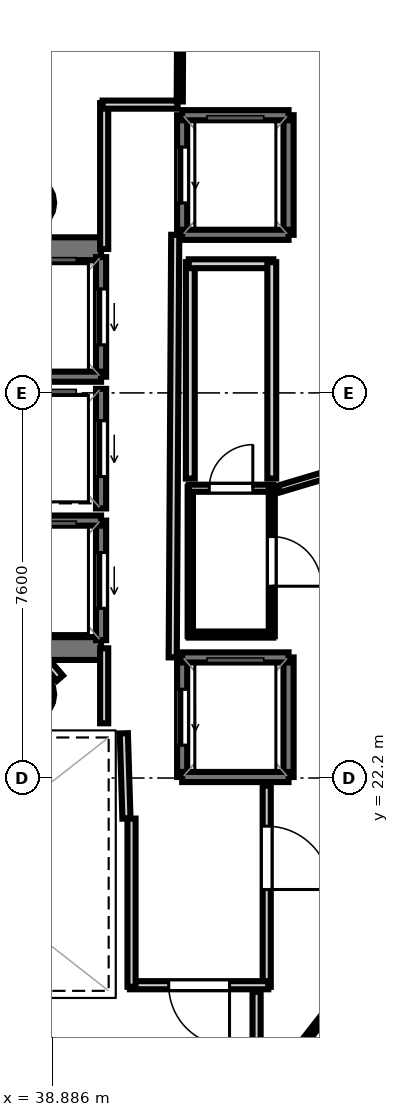
"""IFC4 building model, lengths in metres.
Left out: names, types, materials, properties, quantities, classifications, styles, units other than length and angle.
Written with IfcOpenShell. Run it as: python <this file> out.ifc"""

import sys

from ifc_helpers import new_model, si_unit, direction, frame, frame_2d, origin, origin_2d, place, context, subcontext, project, spatial, rectangle, hollow_circle, extrude, element, fill, save


model = new_model("IFC4")
c1 = context("Model", 3, precision=1e-05, world=origin(), true_north=direction((0.0, 1.0)))
c2 = subcontext(c1, "Body", "Model", "MODEL_VIEW")
j1 = project(units=[si_unit("LENGTHUNIT", "METRE"), si_unit("PLANEANGLEUNIT", "RADIAN")], contexts=[c1])
p1 = place(None, origin())
s1 = spatial("IfcSite", under=j1, at=p1, CompositionType="ELEMENT")
p2 = place(p1, origin())
s2 = spatial("IfcBuilding", under=s1, at=p2, CompositionType="ELEMENT")
p3 = place(p2, frame((0.0, 0.0, 264.9)))
s3 = spatial("IfcBuildingStorey", under=s2, at=p3, CompositionType="ELEMENT", Elevation=264.9)
p4 = place(p3, frame((29.33, 32.645, 0.0), z_axis=(0.0, 0.0, 1.0), x_axis=(1.0, 0.0, 0.0)))
e1 = element("IfcWall", 1, at=p4, inside=s3, PredefinedType="SHEAR", context=c2, shape_type="SweptSolid", body=[
    extrude(rectangle(XDim=10.52, YDim=0.45, at=frame_2d((5.26, 0.0))), origin(), (0.0, 0.0, 1.0), 3.52),
])
p5 = place(p4, frame((0.895, 0.0, 0.0)))
e2 = element("IfcOpeningElement", 2, at=p5, cuts=e1, PredefinedType="OPENING", context=c2, shape_type="SweptSolid", body=[
    extrude(rectangle(XDim=1.25, YDim=2.15, at=frame_2d((0.625, 1.075))), frame((0.0, 0.235, 0.0), z_axis=(0.0, -1.0, 0.0), x_axis=(1.0, 0.0, 0.0)), (0.0, 0.0, 1.0), 0.47),
])
p6 = place(p3, frame((29.33, 24.755, 0.0), z_axis=(0.0, 0.0, 1.0), x_axis=(1.0, 0.0, 0.0)))
e3 = element("IfcWall", 3, at=p6, inside=s3, PredefinedType="SHEAR", context=c2, shape_type="SweptSolid", body=[
    extrude(rectangle(XDim=10.52, YDim=0.45, at=frame_2d((5.26, 0.0))), origin(), (0.0, 0.0, 1.0), 3.52),
])
p7 = place(p6, frame((0.695, 0.0, 0.0)))
e4 = element("IfcOpeningElement", 4, at=p7, cuts=e3, PredefinedType="OPENING", context=c2, shape_type="SweptSolid", body=[
    extrude(rectangle(XDim=1.25, YDim=2.15, at=frame_2d((0.625, 1.075))), frame((0.0, 0.235, 0.0), z_axis=(0.0, -1.0, 0.0), x_axis=(1.0, 0.0, 0.0)), (0.0, 0.0, 1.0), 0.47),
])
for number, where, z_axis, x_axis in (
    (5, (38.4, 33.55, 0.0), (0.0, 0.0, 1.0), (1.0, 0.0, 0.0)),
    (6, (38.4, 23.85, 0.0), (0.0, 0.0, 1.0), (1.0, 0.0, 0.0)),
):
    element("IfcColumn", number, at=place(p3, frame(where, z_axis=z_axis, x_axis=x_axis)), inside=s3, PredefinedType="COLUMN", context=c2, shape_type="SweptSolid", body=[
        extrude(hollow_circle(Radius=0.525, WallThickness=0.028, at=origin_2d()), origin(), (0.0, 0.0, 1.0), 3.7),
    ])
p8 = place(p3, frame((39.85, 30.12, 0.0), z_axis=(0.0, 0.0, 1.0), x_axis=(0.0, 1.0, 0.0)))
e7 = element("IfcWall", 7, at=p8, inside=s3, PredefinedType="SOLIDWALL", context=c2, shape_type="SweptSolid", body=[
    extrude(rectangle(XDim=2.36, YDim=0.2, at=frame_2d((1.18, 0.0))), origin(), (0.0, 0.0, 1.0), 3.52),
])
p9 = place(p8, frame((0.63, 0.0, 0.0)))
e8 = element("IfcOpeningElement", 8, at=p9, cuts=e7, PredefinedType="OPENING", context=c2, shape_type="SweptSolid", body=[
    extrude(rectangle(XDim=1.1, YDim=2.15, at=frame_2d((0.55, 1.075))), frame((0.0, 0.11, 0.0), z_axis=(0.0, -1.0, 0.0), x_axis=(1.0, 0.0, 0.0)), (0.0, 0.0, 1.0), 0.22),
])
p10 = place(p3, frame((37.75, 30.12, 0.0), z_axis=(0.0, 0.0, 1.0), x_axis=(1.0, 0.0, 0.0)))
e9 = element("IfcWall", 9, at=p10, inside=s3, PredefinedType="SOLIDWALL", context=c2, shape_type="SweptSolid", body=[
    extrude(rectangle(XDim=2.1, YDim=0.2, at=frame_2d((1.05, 0.0))), origin(), (0.0, 0.0, 1.0), 3.52),
])
p11 = place(p3, frame((39.85, 24.92, 0.0), z_axis=(0.0, 0.0, 1.0), x_axis=(0.0, 1.0, 0.0)))
e10 = element("IfcWall", 10, at=p11, inside=s3, PredefinedType="SOLIDWALL", context=c2, shape_type="SweptSolid", body=[
    extrude(rectangle(XDim=2.36, YDim=0.2, at=frame_2d((1.18, 0.0))), origin(), (0.0, 0.0, 1.0), 3.52),
])
p12 = place(p11, frame((0.63, 0.0, 0.0)))
e11 = element("IfcOpeningElement", 11, at=p12, cuts=e10, PredefinedType="OPENING", context=c2, shape_type="SweptSolid", body=[
    extrude(rectangle(XDim=1.1, YDim=2.15, at=frame_2d((0.55, 1.075))), frame((0.0, 0.11, 0.0), z_axis=(0.0, -1.0, 0.0), x_axis=(1.0, 0.0, 0.0)), (0.0, 0.0, 1.0), 0.22),
])
p13 = place(p3, frame((37.75, 27.28, 0.0), z_axis=(0.0, 0.0, 1.0), x_axis=(1.0, 0.0, 0.0)))
e12 = element("IfcWall", 12, at=p13, inside=s3, PredefinedType="SOLIDWALL", context=c2, shape_type="SweptSolid", body=[
    extrude(rectangle(XDim=2.1, YDim=0.2, at=frame_2d((1.05, 0.0))), origin(), (0.0, 0.0, 1.0), 3.52),
])
p14 = place(p3, frame((39.85, 27.52, 0.0), z_axis=(0.0, 0.0, 1.0), x_axis=(0.0, 1.0, 0.0)))
e13 = element("IfcWall", 13, at=p14, inside=s3, PredefinedType="SOLIDWALL", context=c2, shape_type="SweptSolid", body=[
    extrude(rectangle(XDim=2.36, YDim=0.2, at=frame_2d((1.18, 0.0))), origin(), (0.0, 0.0, 1.0), 3.52),
])
p15 = place(p14, frame((0.63, 0.0, 0.0)))
e14 = element("IfcOpeningElement", 14, at=p15, cuts=e13, PredefinedType="OPENING", context=c2, shape_type="SweptSolid", body=[
    extrude(rectangle(XDim=1.1, YDim=2.15, at=frame_2d((0.55, 1.075))), frame((0.0, 0.11, 0.0), z_axis=(0.0, -1.0, 0.0), x_axis=(1.0, 0.0, 0.0)), (0.0, 0.0, 1.0), 0.22),
])
p16 = place(p3, frame((43.55, 22.22, 0.0), z_axis=(0.0, 0.0, 1.0), x_axis=(0.0, 1.0, 0.0)))
e15 = element("IfcWall", 15, at=p16, inside=s3, PredefinedType="SOLIDWALL", context=c2, shape_type="SweptSolid", body=[
    extrude(rectangle(XDim=2.36, YDim=0.2, at=frame_2d((1.18, 0.0))), origin(), (0.0, 0.0, 1.0), 3.52),
])
p17 = place(p3, frame((41.45, 22.22, 0.0), z_axis=(0.0, 0.0, 1.0), x_axis=(0.0, 1.0, 0.0)))
e16 = element("IfcWall", 16, at=p17, inside=s3, PredefinedType="SOLIDWALL", context=c2, shape_type="SweptSolid", body=[
    extrude(rectangle(XDim=2.36, YDim=0.2, at=frame_2d((1.18, 0.0))), origin(), (0.0, 0.0, 1.0), 3.52),
])
p18 = place(p17, frame((0.63, 0.0, 0.0)))
e17 = element("IfcOpeningElement", 17, at=p18, cuts=e16, PredefinedType="OPENING", context=c2, shape_type="SweptSolid", body=[
    extrude(rectangle(XDim=1.1, YDim=2.15, at=frame_2d((0.55, 1.075))), frame((0.0, 0.11, 0.0), z_axis=(0.0, -1.0, 0.0), x_axis=(1.0, 0.0, 0.0)), (0.0, 0.0, 1.0), 0.22),
])
for number, where, z_axis, x_axis in (
    (18, (41.45, 24.58, 0.0), (0.0, 0.0, 1.0), (1.0, 0.0, 0.0)),
    (19, (41.45, 22.22, 0.0), (0.0, 0.0, 1.0), (1.0, 0.0, 0.0)),
):
    element("IfcWall", number, at=place(p3, frame(where, z_axis=z_axis, x_axis=x_axis)), inside=s3, PredefinedType="SOLIDWALL", context=c2, shape_type="SweptSolid", body=[
        extrude(rectangle(XDim=2.1, YDim=0.2, at=frame_2d((1.05, 0.0))), origin(), (0.0, 0.0, 1.0), 3.52),
    ])
p19 = place(p3, frame((43.55, 32.92, 0.0), z_axis=(0.0, 0.0, 1.0), x_axis=(0.0, 1.0, 0.0)))
e20 = element("IfcWall", 20, at=p19, inside=s3, PredefinedType="SOLIDWALL", context=c2, shape_type="SweptSolid", body=[
    extrude(rectangle(XDim=2.36, YDim=0.2, at=frame_2d((1.18, 0.0))), origin(), (0.0, 0.0, 1.0), 3.52),
])
p20 = place(p3, frame((41.45, 32.92, 0.0), z_axis=(0.0, 0.0, 1.0), x_axis=(0.0, 1.0, 0.0)))
e21 = element("IfcWall", 21, at=p20, inside=s3, PredefinedType="SOLIDWALL", context=c2, shape_type="SweptSolid", body=[
    extrude(rectangle(XDim=2.36, YDim=0.2, at=frame_2d((1.18, 0.0))), origin(), (0.0, 0.0, 1.0), 3.52),
])
p21 = place(p20, frame((0.63, 0.0, 0.0)))
e22 = element("IfcOpeningElement", 22, at=p21, cuts=e21, PredefinedType="OPENING", context=c2, shape_type="SweptSolid", body=[
    extrude(rectangle(XDim=1.1, YDim=2.15, at=frame_2d((0.55, 1.075))), frame((0.0, 0.11, 0.0), z_axis=(0.0, -1.0, 0.0), x_axis=(1.0, 0.0, 0.0)), (0.0, 0.0, 1.0), 0.22),
])
for number, where, z_axis, x_axis in (
    (23, (41.45, 35.28, 0.0), (0.0, 0.0, 1.0), (1.0, 0.0, 0.0)),
    (24, (41.45, 32.92, 0.0), (0.0, 0.0, 1.0), (1.0, 0.0, 0.0)),
):
    element("IfcWall", number, at=place(p3, frame(where, z_axis=z_axis, x_axis=x_axis)), inside=s3, PredefinedType="SOLIDWALL", context=c2, shape_type="SweptSolid", body=[
        extrude(rectangle(XDim=2.1, YDim=0.2, at=frame_2d((1.05, 0.0))), origin(), (0.0, 0.0, 1.0), 3.52),
    ])
p22 = place(p3, frame((40.351, 21.401, 0.0), z_axis=(0.0, 0.0, 1.0), x_axis=(-0.031058045979, 0.999517582527, 0.0)))
e25 = element("IfcWall", 25, at=p22, inside=s3, PredefinedType="PARTITIONING", context=c2, shape_type="SweptSolid", body=[
    extrude(rectangle(XDim=1.682, YDim=0.16, at=frame_2d((0.841, 0.0))), origin(), (0.0, 0.0, 1.0), 2.84),
])
p23 = place(p3, frame((39.911, 23.28, 0.0), z_axis=(0.0, 0.0, 1.0), x_axis=(0.0, 1.0, 0.0)))
e26 = element("IfcWall", 26, at=p23, inside=s3, PredefinedType="PARTITIONING", context=c2, shape_type="SweptSolid", body=[
    extrude(rectangle(XDim=1.48, YDim=0.16, at=frame_2d((0.74, 0.0))), origin(), (0.0, 0.0, 1.0), 2.84),
])
p24 = place(p3, frame((39.911, 32.64, 0.0), z_axis=(0.0, 0.0, 1.0), x_axis=(0.0, 1.0, 0.0)))
e27 = element("IfcWall", 27, at=p24, inside=s3, PredefinedType="PARTITIONING", context=c2, shape_type="SweptSolid", body=[
    extrude(rectangle(XDim=2.88, YDim=0.16, at=frame_2d((1.44, 0.0))), origin(), (0.0, 0.0, 1.0), 2.84),
])
p25 = place(p3, frame((39.88, 35.489, 0.0), z_axis=(0.0, 0.0, 1.0), x_axis=(1.0, 0.0, 0.0)))
e28 = element("IfcWall", 28, at=p25, inside=s3, PredefinedType="PARTITIONING", context=c2, shape_type="SweptSolid", body=[
    extrude(rectangle(XDim=1.48, YDim=0.16, at=frame_2d((0.74, 0.0))), origin(), (0.0, 0.0, 1.0), 2.84),
])
p26 = place(p3, frame((41.313, 32.92, 0.0), z_axis=(0.0, 0.0, 1.0), x_axis=(-0.005942518022, -0.999982343084, 0.0)))
e29 = element("IfcWall", 29, at=p26, inside=s3, PredefinedType="PARTITIONING", context=c2, shape_type="SweptSolid", body=[
    extrude(rectangle(XDim=8.34, YDim=0.16, at=frame_2d((4.17, 0.0))), origin(), (0.0, 0.0, 1.0), 2.84),
])
p27 = place(p3, frame((43.119, 22.05, 0.0), z_axis=(0.0, 0.0, 1.0), x_axis=(0.0, -1.0, 0.0)))
e30 = element("IfcWall", 30, at=p27, inside=s3, PredefinedType="PARTITIONING", context=c2, shape_type="SweptSolid", body=[
    extrude(rectangle(XDim=3.97, YDim=0.16, at=frame_2d((1.985, 0.0))), origin(), (0.0, 0.0, 1.0), 2.84),
])
p28 = place(p27, frame((0.8, 0.0, 0.0)))
e31 = element("IfcOpeningElement", 31, at=p28, cuts=e30, PredefinedType="OPENING", context=c2, shape_type="SweptSolid", body=[
    extrude(rectangle(XDim=1.25, YDim=2.2, at=frame_2d((0.625, 1.1))), frame((0.0, 0.09, 0.0), z_axis=(0.0, -1.0, 0.0), x_axis=(1.0, 0.0, 0.0)), (0.0, 0.0, 1.0), 0.18),
])
p29 = place(p3, frame((43.15, 18.111, 0.0), z_axis=(0.0, 0.0, 1.0), x_axis=(-1.0, 0.0, 0.0)))
e32 = element("IfcWall", 32, at=p29, inside=s3, PredefinedType="PARTITIONING", context=c2, shape_type="SweptSolid", body=[
    extrude(rectangle(XDim=2.73, YDim=0.16, at=frame_2d((1.365, 0.0))), origin(), (0.0, 0.0, 1.0), 2.84),
])
p30 = place(p29, frame((0.765, 0.0, 0.0)))
e33 = element("IfcOpeningElement", 33, at=p30, cuts=e32, PredefinedType="OPENING", context=c2, shape_type="SweptSolid", body=[
    extrude(rectangle(XDim=1.2, YDim=2.15, at=frame_2d((0.6, 1.075))), frame((0.0, 0.09, 0.0), z_axis=(0.0, -1.0, 0.0), x_axis=(1.0, 0.0, 0.0)), (0.0, 0.0, 1.0), 0.18),
])
p31 = place(p3, frame((40.451, 18.08, 0.0), z_axis=(0.0, 0.0, 1.0), x_axis=(0.0, 1.0, 0.0)))
e34 = element("IfcWall", 34, at=p31, inside=s3, PredefinedType="PARTITIONING", context=c2, shape_type="SweptSolid", body=[
    extrude(rectangle(XDim=3.32, YDim=0.16, at=frame_2d((1.66, 0.0))), origin(), (0.0, 0.0, 1.0), 2.84),
])
p32 = place(p3, frame((43.25, 25.031, 0.0), z_axis=(0.0, 0.0, 1.0), x_axis=(-1.0, 0.0, 0.0)))
e35 = element("IfcWall", 35, at=p32, inside=s3, PredefinedType="PARTITIONING", context=c2, shape_type="SweptSolid", body=[
    extrude(rectangle(XDim=1.67, YDim=0.12, at=frame_2d((0.835, 0.0))), origin(), (0.0, 0.0, 1.0), 2.84),
])
p33 = place(p3, frame((41.611, 25.0, 0.0), z_axis=(0.0, 0.0, 1.0), x_axis=(0.0, 1.0, 0.0)))
e36 = element("IfcWall", 36, at=p33, inside=s3, PredefinedType="PARTITIONING", context=c2, shape_type="SweptSolid", body=[
    extrude(rectangle(XDim=2.95, YDim=0.105, at=frame_2d((1.475, 0.0))), origin(), (0.0, 0.0, 1.0), 2.84),
])
p34 = place(p3, frame((41.58, 27.919, 0.0), z_axis=(0.0, 0.0, 1.0), x_axis=(1.0, 0.0, 0.0)))
e37 = element("IfcWall", 37, at=p34, inside=s3, PredefinedType="PARTITIONING", context=c2, shape_type="SweptSolid", body=[
    extrude(rectangle(XDim=1.67, YDim=0.14, at=frame_2d((0.835, 0.0))), origin(), (0.0, 0.0, 1.0), 2.84),
])
p35 = place(p34, frame((0.405, 0.0, 0.0)))
e38 = element("IfcOpeningElement", 38, at=p35, cuts=e37, PredefinedType="OPENING", context=c2, shape_type="SweptSolid", body=[
    extrude(rectangle(XDim=0.86, YDim=2.05, at=frame_2d((0.43, 1.025))), frame((0.0, 0.08, 0.0), z_axis=(0.0, -1.0, 0.0), x_axis=(1.0, 0.0, 0.0)), (0.0, 0.0, 1.0), 0.16),
])
p36 = place(p3, frame((43.219, 27.95, 0.0), z_axis=(0.0, 0.0, 1.0), x_axis=(0.0, -1.0, 0.0)))
e39 = element("IfcWall", 39, at=p36, inside=s3, PredefinedType="PARTITIONING", context=c2, shape_type="SweptSolid", body=[
    extrude(rectangle(XDim=2.95, YDim=0.12, at=frame_2d((1.475, 0.0))), origin(), (0.0, 0.0, 1.0), 2.84),
])
p37 = place(p36, frame((0.985, 0.0, 0.0)))
e40 = element("IfcOpeningElement", 40, at=p37, cuts=e39, PredefinedType="OPENING", context=c2, shape_type="SweptSolid", body=[
    extrude(rectangle(XDim=0.98, YDim=2.1, at=frame_2d((0.49, 1.05))), frame((0.0, 0.07, 0.0), z_axis=(0.0, -1.0, 0.0), x_axis=(1.0, 0.0, 0.0)), (0.0, 0.0, 1.0), 0.14),
])
p38 = place(p3, frame((41.611, 28.11, 0.0), z_axis=(0.0, 0.0, 1.0), x_axis=(0.0, 1.0, 0.0)))
e41 = element("IfcWall", 41, at=p38, inside=s3, PredefinedType="PLUMBINGWALL", context=c2, shape_type="SweptSolid", body=[
    extrude(rectangle(XDim=4.27, YDim=0.175, at=frame_2d((2.135, 0.0))), origin(), (0.0, 0.0, 1.0), 2.84),
])
p39 = place(p3, frame((41.58, 32.349, 0.0), z_axis=(0.0, 0.0, 1.0), x_axis=(1.0, 0.0, 0.0)))
e42 = element("IfcWall", 42, at=p39, inside=s3, PredefinedType="PLUMBINGWALL", context=c2, shape_type="SweptSolid", body=[
    extrude(rectangle(XDim=1.67, YDim=0.175, at=frame_2d((0.835, 0.0))), origin(), (0.0, 0.0, 1.0), 2.84),
])
p40 = place(p3, frame((43.219, 32.38, 0.0), z_axis=(0.0, 0.0, 1.0), x_axis=(0.0, -1.0, 0.0)))
e43 = element("IfcWall", 43, at=p40, inside=s3, PredefinedType="PLUMBINGWALL", context=c2, shape_type="SweptSolid", body=[
    extrude(rectangle(XDim=4.27, YDim=0.175, at=frame_2d((2.135, 0.0))), origin(), (0.0, 0.0, 1.0), 2.84),
])
p41 = place(p3, frame((39.036, 24.17, 0.0), z_axis=(0.0, 0.0, 1.0), x_axis=(-0.652260263346, 0.757995084984, 0.0)))
e44 = element("IfcWall", 44, at=p41, inside=s3, PredefinedType="PARTITIONING", context=c2, shape_type="SweptSolid", body=[
    extrude(rectangle(XDim=0.355, YDim=0.16, at=frame_2d((0.178, 0.0))), origin(), (0.0, 0.0, 1.0), 2.84),
])
p42 = place(p3, frame((42.919, 17.98, 0.0), z_axis=(0.0, 0.0, 1.0), x_axis=(0.0, -1.0, 0.0)))
e45 = element("IfcWall", 45, at=p42, inside=s3, PredefinedType="PARTITIONING", context=c2, shape_type="SweptSolid", body=[
    extrude(rectangle(XDim=3.106, YDim=0.16, at=frame_2d((1.553, 0.0))), origin(), (0.0, 0.0, 1.0), 2.84),
])
p43 = place(p3, frame((43.359, 27.903, 0.0), z_axis=(0.0, 0.0, 1.0), x_axis=(0.958100890782, 0.286430939464, 0.0)))
e46 = element("IfcWall", 46, at=p43, inside=s3, PredefinedType="PARTITIONING", context=c2, shape_type="SweptSolid", body=[
    extrude(rectangle(XDim=13.241, YDim=0.14, at=frame_2d((6.621, 0.0))), origin(), (0.0, 0.0, 1.0), 2.84),
])
p44 = place(p43, frame((5.933, 0.0, 0.0)))
e47 = element("IfcOpeningElement", 47, at=p44, cuts=e46, PredefinedType="OPENING", context=c2, shape_type="SweptSolid", body=[
    extrude(rectangle(XDim=1.25, YDim=2.2, at=frame_2d((0.625, 1.1))), frame((0.0, 0.08, 0.0), z_axis=(0.0, -1.0, 0.0), x_axis=(1.0, 0.0, 0.0)), (0.0, 0.0, 1.0), 0.16),
])
p45 = place(p3, frame((55.174, 31.494, 0.0), z_axis=(0.0, 0.0, 1.0), x_axis=(-0.615208730104, -0.788364267584, 0.0)))
e48 = element("IfcWall", 48, at=p45, inside=s3, PredefinedType="PARTITIONING", context=c2, shape_type="SweptSolid", body=[
    extrude(rectangle(XDim=26.507, YDim=0.12, at=frame_2d((13.253, 0.0))), origin(), (0.0, 0.0, 1.0), 2.84),
])
p46 = place(p3, frame((41.412, 37.371, 0.0), z_axis=(0.0, 0.0, 1.0), x_axis=(-0.005232720523, -0.999986309224, 0.0)))
e49 = element("IfcWall", 49, at=p46, inside=s3, PredefinedType="PARTITIONING", context=c2, shape_type="SweptSolid", body=[
    extrude(rectangle(XDim=1.82, YDim=0.12, at=frame_2d((0.91, 0.0))), origin(), (0.0, 0.0, 1.0), 2.84),
])
p47 = place(p9, origin())
e50 = element("IfcDoor", 50, at=p47, inside=s3, OperationType="SLIDING_TO_LEFT", PredefinedType="DOOR", context=c2, shape_type="SweptSolid", body=[
    extrude(rectangle(XDim=1.1, YDim=2.15, at=frame_2d((0.55, 1.075))), frame((0.0, 0.025, 0.0), z_axis=(0.0, -1.0, 0.0), x_axis=(1.0, 0.0, 0.0)), (0.0, 0.0, 1.0), 0.05),
])
fill(e8, e50)
p48 = place(p12, origin())
e51 = element("IfcDoor", 51, at=p48, inside=s3, OperationType="SLIDING_TO_LEFT", PredefinedType="DOOR", context=c2, shape_type="SweptSolid", body=[
    extrude(rectangle(XDim=1.1, YDim=2.15, at=frame_2d((0.55, 1.075))), frame((0.0, 0.025, 0.0), z_axis=(0.0, -1.0, 0.0), x_axis=(1.0, 0.0, 0.0)), (0.0, 0.0, 1.0), 0.05),
])
fill(e11, e51)
p49 = place(p15, origin())
e52 = element("IfcDoor", 52, at=p49, inside=s3, OperationType="SLIDING_TO_LEFT", PredefinedType="DOOR", context=c2, shape_type="SweptSolid", body=[
    extrude(rectangle(XDim=1.1, YDim=2.15, at=frame_2d((0.55, 1.075))), frame((0.0, 0.025, 0.0), z_axis=(0.0, -1.0, 0.0), x_axis=(1.0, 0.0, 0.0)), (0.0, 0.0, 1.0), 0.05),
])
fill(e14, e52)
p50 = place(p18, origin())
e53 = element("IfcDoor", 53, at=p50, inside=s3, OperationType="SLIDING_TO_LEFT", PredefinedType="DOOR", context=c2, shape_type="SweptSolid", body=[
    extrude(rectangle(XDim=1.1, YDim=2.15, at=frame_2d((0.55, 1.075))), frame((0.0, 0.025, 0.0), z_axis=(0.0, -1.0, 0.0), x_axis=(1.0, 0.0, 0.0)), (0.0, 0.0, 1.0), 0.05),
])
fill(e17, e53)
p51 = place(p21, origin())
e54 = element("IfcDoor", 54, at=p51, inside=s3, OperationType="SLIDING_TO_LEFT", PredefinedType="DOOR", context=c2, shape_type="SweptSolid", body=[
    extrude(rectangle(XDim=1.1, YDim=2.15, at=frame_2d((0.55, 1.075))), frame((0.0, 0.025, 0.0), z_axis=(0.0, -1.0, 0.0), x_axis=(1.0, 0.0, 0.0)), (0.0, 0.0, 1.0), 0.05),
])
fill(e22, e54)
p52 = place(p30, origin())
e55 = element("IfcDoor", 55, at=p52, inside=s3, OperationType="SINGLE_SWING_LEFT", PredefinedType="DOOR", context=c2, shape_type="SweptSolid", body=[
    extrude(rectangle(XDim=1.2, YDim=2.15, at=frame_2d((0.6, 1.075))), frame((0.0, 0.025, 0.0), z_axis=(0.0, -1.0, 0.0), x_axis=(1.0, 0.0, 0.0)), (0.0, 0.0, 1.0), 0.05),
])
fill(e33, e55)
p53 = place(p28, origin())
e56 = element("IfcDoor", 56, at=p53, inside=s3, OperationType="SINGLE_SWING_RIGHT", PredefinedType="DOOR", context=c2, shape_type="SweptSolid", body=[
    extrude(rectangle(XDim=1.25, YDim=2.2, at=frame_2d((0.625, 1.1))), frame((0.0, 0.025, 0.0), z_axis=(0.0, -1.0, 0.0), x_axis=(1.0, 0.0, 0.0)), (0.0, 0.0, 1.0), 0.05),
])
fill(e31, e56)
p54 = place(p37, origin())
e57 = element("IfcDoor", 57, at=p54, inside=s3, OperationType="SINGLE_SWING_RIGHT", PredefinedType="DOOR", context=c2, shape_type="SweptSolid", body=[
    extrude(rectangle(XDim=0.98, YDim=2.1, at=frame_2d((0.49, 1.05))), frame((0.0, 0.025, 0.0), z_axis=(0.0, -1.0, 0.0), x_axis=(1.0, 0.0, 0.0)), (0.0, 0.0, 1.0), 0.05),
])
fill(e40, e57)
p55 = place(p35, origin())
e58 = element("IfcDoor", 58, at=p55, inside=s3, OperationType="SINGLE_SWING_RIGHT", PredefinedType="DOOR", context=c2, shape_type="SweptSolid", body=[
    extrude(rectangle(XDim=0.86, YDim=2.05, at=frame_2d((0.43, 1.025))), frame((0.0, 0.025, 0.0), z_axis=(0.0, -1.0, 0.0), x_axis=(1.0, 0.0, 0.0)), (0.0, 0.0, 1.0), 0.05),
])
fill(e38, e58)
save(model, sys.argv[1])
